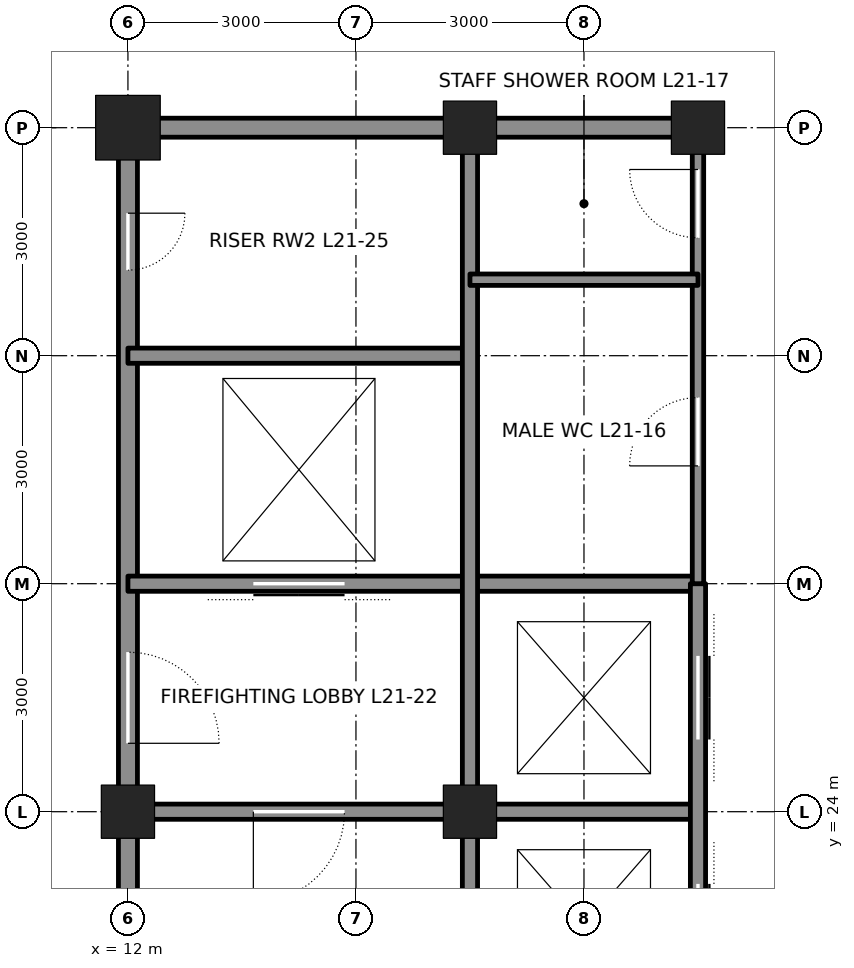
"""IFC4 building model, lengths in metres.
Left out: names, types, materials, properties, quantities, classifications, styles, units other than length and angle.
Written with IfcOpenShell. Run it as: python <this file> out.ifc"""

import sys

from ifc_helpers import new_model, si_unit, direction, frame, frame_2d, origin, origin_2d, place, context, subcontext, project, spatial, rectangle, hollow_rectangle, extrude, element, fill, save


model = new_model("IFC4")
c1 = context("Model", 3, precision=1e-05, world=origin(), true_north=direction((0.0, 1.0)))
c2 = subcontext(c1, "Body", "Model", "MODEL_VIEW")
j1 = project(units=[si_unit("LENGTHUNIT", "METRE"), si_unit("PLANEANGLEUNIT", "RADIAN")], contexts=[c1])
p1 = place(None, origin())
s1 = spatial("IfcSite", under=j1, at=p1, CompositionType="ELEMENT")
p2 = place(p1, origin())
s2 = spatial("IfcBuilding", under=s1, at=p2, CompositionType="ELEMENT")
p3 = place(p2, frame((0.0, 0.0, 102.3)))
s3 = spatial("IfcBuildingStorey", under=s2, at=p3, CompositionType="ELEMENT", Elevation=102.3)
p4 = place(p3, frame((12.0, 33.0, 0.0), z_axis=(0.0, 0.0, 1.0), x_axis=(1.0, 0.0, 0.0)))
e1 = element("IfcColumn", 1, at=p4, inside=s3, PredefinedType="COLUMN", context=c2, shape_type="SweptSolid", body=[
    extrude(hollow_rectangle(XDim=0.85, YDim=0.85, WallThickness=0.085, at=origin_2d()), origin(), (0.0, 0.0, 1.0), 4.5),
])
for number, where, z_axis, x_axis in (
    (2, (16.5, 33.0, 0.0), (0.0, 0.0, 1.0), (1.0, 0.0, 0.0)),
    (3, (19.5, 33.0, 0.0), (0.0, 0.0, 1.0), (1.0, 0.0, 0.0)),
    (4, (12.0, 24.0, 0.0), (0.0, 0.0, 1.0), (1.0, 0.0, 0.0)),
    (5, (16.5, 24.0, 0.0), (0.0, 0.0, 1.0), (1.0, 0.0, 0.0)),
):
    element("IfcColumn", number, at=place(p3, frame(where, z_axis=z_axis, x_axis=x_axis)), inside=s3, PredefinedType="COLUMN", context=c2, shape_type="SweptSolid", body=[
        extrude(hollow_rectangle(XDim=0.7, YDim=0.7, WallThickness=0.07, at=origin_2d()), origin(), (0.0, 0.0, 1.0), 4.5),
    ])
p5 = place(p3, frame((12.0, 21.25, 0.0), z_axis=(0.0, 0.0, 1.0), x_axis=(0.0, 1.0, 0.0)))
e6 = element("IfcWall", 6, at=p5, inside=s3, PredefinedType="SOLIDWALL", context=c2, shape_type="SweptSolid", body=[
    extrude(rectangle(XDim=2.5, YDim=0.25, at=frame_2d((1.25, 0.0))), origin(), (0.0, 0.0, 1.0), 3.413),
])
p6 = place(p3, frame((12.0, 24.25, 0.0), z_axis=(0.0, 0.0, 1.0), x_axis=(0.0, 1.0, 0.0)))
e7 = element("IfcWall", 7, at=p6, inside=s3, PredefinedType="SOLIDWALL", context=c2, shape_type="SweptSolid", body=[
    extrude(rectangle(XDim=8.5, YDim=0.25, at=frame_2d((4.25, 0.0))), origin(), (0.0, 0.0, 1.0), 3.413),
])
p7 = place(p6, frame((0.65, 0.0, 0.0)))
e8 = element("IfcOpeningElement", 8, at=p7, cuts=e7, PredefinedType="OPENING", context=c2, shape_type="SweptSolid", body=[
    extrude(rectangle(XDim=1.2, YDim=2.1, at=frame_2d((0.6, 1.05))), frame((0.0, 0.135, 0.0), z_axis=(0.0, -1.0, 0.0), x_axis=(1.0, 0.0, 0.0)), (0.0, 0.0, 1.0), 0.27),
])
p8 = place(p6, frame((6.875, 0.0, 0.0)))
e9 = element("IfcOpeningElement", 9, at=p8, cuts=e7, PredefinedType="OPENING", context=c2, shape_type="SweptSolid", body=[
    extrude(rectangle(XDim=0.75, YDim=2.1, at=frame_2d((0.375, 1.05))), frame((0.0, 0.135, 0.0), z_axis=(0.0, -1.0, 0.0), x_axis=(1.0, 0.0, 0.0)), (0.0, 0.0, 1.0), 0.27),
])
p9 = place(p3, frame((12.25, 24.0, 0.0), z_axis=(0.0, 0.0, 1.0), x_axis=(1.0, 0.0, 0.0)))
e10 = element("IfcWall", 10, at=p9, inside=s3, PredefinedType="SOLIDWALL", context=c2, shape_type="SweptSolid", body=[
    extrude(rectangle(XDim=4.0, YDim=0.2, at=frame_2d((2.0, 0.0))), origin(), (0.0, 0.0, 1.0), 3.39),
])
p10 = place(p9, frame((1.4, 0.0, 0.0)))
e11 = element("IfcOpeningElement", 11, at=p10, cuts=e10, PredefinedType="OPENING", context=c2, shape_type="SweptSolid", body=[
    extrude(rectangle(XDim=1.2, YDim=2.1, at=frame_2d((0.6, 1.05))), frame((0.0, 0.11, 0.0), z_axis=(0.0, -1.0, 0.0), x_axis=(1.0, 0.0, 0.0)), (0.0, 0.0, 1.0), 0.22),
])
p11 = place(p3, frame((16.75, 24.0, 0.0), z_axis=(0.0, 0.0, 1.0), x_axis=(1.0, 0.0, 0.0)))
e12 = element("IfcWall", 12, at=p11, inside=s3, PredefinedType="SOLIDWALL", context=c2, shape_type="SweptSolid", body=[
    extrude(rectangle(XDim=2.75, YDim=0.2, at=frame_2d((1.375, 0.0))), origin(), (0.0, 0.0, 1.0), 3.39),
])
p12 = place(p3, frame((12.0, 27.0, 0.0), z_axis=(0.0, 0.0, 1.0), x_axis=(1.0, 0.0, 0.0)))
e13 = element("IfcWall", 13, at=p12, inside=s3, PredefinedType="SOLIDWALL", context=c2, shape_type="SweptSolid", body=[
    extrude(rectangle(XDim=7.5, YDim=0.2, at=frame_2d((3.75, 0.0))), origin(), (0.0, 0.0, 1.0), 4.34),
])
p13 = place(p12, frame((1.65, 0.0, 0.0)))
e14 = element("IfcOpeningElement", 14, at=p13, cuts=e13, PredefinedType="OPENING", context=c2, shape_type="SweptSolid", body=[
    extrude(rectangle(XDim=1.2, YDim=2.1, at=frame_2d((0.6, 1.05))), frame((0.0, 0.11, 0.0), z_axis=(0.0, -1.0, 0.0), x_axis=(1.0, 0.0, 0.0)), (0.0, 0.0, 1.0), 0.22),
])
p14 = place(p3, frame((12.0, 30.0, 0.0), z_axis=(0.0, 0.0, 1.0), x_axis=(1.0, 0.0, 0.0)))
e15 = element("IfcWall", 15, at=p14, inside=s3, PredefinedType="SOLIDWALL", context=c2, shape_type="SweptSolid", body=[
    extrude(rectangle(XDim=4.5, YDim=0.2, at=frame_2d((2.25, 0.0))), origin(), (0.0, 0.0, 1.0), 4.34),
])
p15 = place(p3, frame((12.25, 33.0, 0.0), z_axis=(0.0, 0.0, 1.0), x_axis=(1.0, 0.0, 0.0)))
e16 = element("IfcWall", 16, at=p15, inside=s3, PredefinedType="SOLIDWALL", context=c2, shape_type="SweptSolid", body=[
    extrude(rectangle(XDim=4.0, YDim=0.25, at=frame_2d((2.0, 0.0))), origin(), (0.0, 0.0, 1.0), 3.481),
])
p16 = place(p3, frame((16.75, 33.0, 0.0), z_axis=(0.0, 0.0, 1.0), x_axis=(1.0, 0.0, 0.0)))
e17 = element("IfcWall", 17, at=p16, inside=s3, PredefinedType="SOLIDWALL", context=c2, shape_type="SweptSolid", body=[
    extrude(rectangle(XDim=2.5, YDim=0.25, at=frame_2d((1.25, 0.0))), origin(), (0.0, 0.0, 1.0), 3.481),
])
p17 = place(p3, frame((16.5, 21.25, 0.0), z_axis=(0.0, 0.0, 1.0), x_axis=(0.0, 1.0, 0.0)))
e18 = element("IfcWall", 18, at=p17, inside=s3, PredefinedType="SOLIDWALL", context=c2, shape_type="SweptSolid", body=[
    extrude(rectangle(XDim=2.5, YDim=0.2, at=frame_2d((1.25, 0.0))), origin(), (0.0, 0.0, 1.0), 3.413),
])
p18 = place(p3, frame((16.5, 24.25, 0.0), z_axis=(0.0, 0.0, 1.0), x_axis=(0.0, 1.0, 0.0)))
e19 = element("IfcWall", 19, at=p18, inside=s3, PredefinedType="SOLIDWALL", context=c2, shape_type="SweptSolid", body=[
    extrude(rectangle(XDim=8.5, YDim=0.2, at=frame_2d((4.25, 0.0))), origin(), (0.0, 0.0, 1.0), 3.413),
])
p19 = place(p3, frame((19.5, 15.0, 0.0), z_axis=(0.0, 0.0, 1.0), x_axis=(0.0, 1.0, 0.0)))
e20 = element("IfcWall", 20, at=p19, inside=s3, PredefinedType="SOLIDWALL", context=c2, shape_type="SweptSolid", body=[
    extrude(rectangle(XDim=12.0, YDim=0.2, at=frame_2d((6.0, 0.0))), origin(), (0.0, 0.0, 1.0), 3.365),
])
p20 = place(p19, frame((0.95, 0.0, 0.0)))
e21 = element("IfcOpeningElement", 21, at=p20, cuts=e20, PredefinedType="OPENING", context=c2, shape_type="SweptSolid", body=[
    extrude(rectangle(XDim=1.1, YDim=2.1, at=frame_2d((0.55, 1.05))), frame((0.0, 0.11, 0.0), z_axis=(0.0, -1.0, 0.0), x_axis=(1.0, 0.0, 0.0)), (0.0, 0.0, 1.0), 0.22),
])
p21 = place(p19, frame((3.95, 0.0, 0.0)))
e22 = element("IfcOpeningElement", 22, at=p21, cuts=e20, PredefinedType="OPENING", context=c2, shape_type="SweptSolid", body=[
    extrude(rectangle(XDim=1.1, YDim=2.1, at=frame_2d((0.55, 1.05))), frame((0.0, 0.11, 0.0), z_axis=(0.0, -1.0, 0.0), x_axis=(1.0, 0.0, 0.0)), (0.0, 0.0, 1.0), 0.22),
])
p22 = place(p19, frame((6.95, 0.0, 0.0)))
e23 = element("IfcOpeningElement", 23, at=p22, cuts=e20, PredefinedType="OPENING", context=c2, shape_type="SweptSolid", body=[
    extrude(rectangle(XDim=1.1, YDim=2.1, at=frame_2d((0.55, 1.05))), frame((0.0, 0.11, 0.0), z_axis=(0.0, -1.0, 0.0), x_axis=(1.0, 0.0, 0.0)), (0.0, 0.0, 1.0), 0.22),
])
p23 = place(p19, frame((9.95, 0.0, 0.0)))
e24 = element("IfcOpeningElement", 24, at=p23, cuts=e20, PredefinedType="OPENING", context=c2, shape_type="SweptSolid", body=[
    extrude(rectangle(XDim=1.1, YDim=2.1, at=frame_2d((0.55, 1.05))), frame((0.0, 0.11, 0.0), z_axis=(0.0, -1.0, 0.0), x_axis=(1.0, 0.0, 0.0)), (0.0, 0.0, 1.0), 0.22),
])
p24 = place(p3, frame((19.5, 27.0, 0.0), z_axis=(0.0, 0.0, 1.0), x_axis=(0.0, 1.0, 0.0)))
e25 = element("IfcWall", 25, at=p24, inside=s3, PredefinedType="PARTITIONING", context=c2, shape_type="SweptSolid", body=[
    extrude(rectangle(XDim=5.75, YDim=0.15, at=frame_2d((2.875, 0.0))), origin(), (0.0, 0.0, 1.0), 3.365),
])
p25 = place(p24, frame((1.55, 0.0, 0.0)))
e26 = element("IfcOpeningElement", 26, at=p25, cuts=e25, PredefinedType="OPENING", context=c2, shape_type="SweptSolid", body=[
    extrude(rectangle(XDim=0.9, YDim=2.1, at=frame_2d((0.45, 1.05))), frame((0.0, 0.085, 0.0), z_axis=(0.0, -1.0, 0.0), x_axis=(1.0, 0.0, 0.0)), (0.0, 0.0, 1.0), 0.17),
])
p26 = place(p24, frame((4.55, 0.0, 0.0)))
e27 = element("IfcOpeningElement", 27, at=p26, cuts=e25, PredefinedType="OPENING", context=c2, shape_type="SweptSolid", body=[
    extrude(rectangle(XDim=0.9, YDim=2.1, at=frame_2d((0.45, 1.05))), frame((0.0, 0.085, 0.0), z_axis=(0.0, -1.0, 0.0), x_axis=(1.0, 0.0, 0.0)), (0.0, 0.0, 1.0), 0.17),
])
p27 = place(p3, frame((16.5, 31.0, 0.0), z_axis=(0.0, 0.0, 1.0), x_axis=(1.0, 0.0, 0.0)))
e28 = element("IfcWall", 28, at=p27, inside=s3, PredefinedType="PARTITIONING", context=c2, shape_type="SweptSolid", body=[
    extrude(rectangle(XDim=3.0, YDim=0.15, at=frame_2d((1.5, 0.0))), origin(), (0.0, 0.0, 1.0), 4.34),
])
p28 = place(p10, frame((1.2, 0.0, 0.0), z_axis=(0.0, 0.0, 1.0), x_axis=(-1.0, 0.0, 0.0)))
e29 = element("IfcDoor", 29, at=p28, inside=s3, OperationType="SINGLE_SWING_RIGHT", PredefinedType="DOOR", context=c2, shape_type="SweptSolid", body=[
    extrude(rectangle(XDim=1.2, YDim=2.1, at=frame_2d((0.6, 1.05))), frame((0.0, 0.025, 0.0), z_axis=(0.0, -1.0, 0.0), x_axis=(1.0, 0.0, 0.0)), (0.0, 0.0, 1.0), 0.05),
])
fill(e11, e29)
p29 = place(p7, frame((1.2, 0.0, 0.0), z_axis=(0.0, 0.0, 1.0), x_axis=(-1.0, 0.0, 0.0)))
e30 = element("IfcDoor", 30, at=p29, inside=s3, OperationType="SINGLE_SWING_RIGHT", PredefinedType="DOOR", context=c2, shape_type="SweptSolid", body=[
    extrude(rectangle(XDim=1.2, YDim=2.1, at=frame_2d((0.6, 1.05))), frame((0.0, 0.025, 0.0), z_axis=(0.0, -1.0, 0.0), x_axis=(1.0, 0.0, 0.0)), (0.0, 0.0, 1.0), 0.05),
])
fill(e8, e30)
p30 = place(p13, origin())
e31 = element("IfcDoor", 31, at=p30, inside=s3, OperationType="DOUBLE_DOOR_SLIDING", PredefinedType="DOOR", context=c2, shape_type="SweptSolid", body=[
    extrude(rectangle(XDim=1.2, YDim=2.1, at=frame_2d((0.6, 1.05))), frame((0.0, 0.025, 0.0), z_axis=(0.0, -1.0, 0.0), x_axis=(1.0, 0.0, 0.0)), (0.0, 0.0, 1.0), 0.05),
])
fill(e14, e31)
p31 = place(p8, frame((0.75, 0.0, 0.0), z_axis=(0.0, 0.0, 1.0), x_axis=(-1.0, 0.0, 0.0)))
e32 = element("IfcDoor", 32, at=p31, inside=s3, OperationType="SINGLE_SWING_LEFT", PredefinedType="DOOR", context=c2, shape_type="SweptSolid", body=[
    extrude(rectangle(XDim=0.75, YDim=2.1, at=frame_2d((0.375, 1.05))), frame((0.0, 0.025, 0.0), z_axis=(0.0, -1.0, 0.0), x_axis=(1.0, 0.0, 0.0)), (0.0, 0.0, 1.0), 0.05),
])
fill(e9, e32)
p32 = place(p25, origin())
e33 = element("IfcDoor", 33, at=p32, inside=s3, OperationType="SINGLE_SWING_LEFT", PredefinedType="DOOR", context=c2, shape_type="SweptSolid", body=[
    extrude(rectangle(XDim=0.9, YDim=2.1, at=frame_2d((0.45, 1.05))), frame((0.0, 0.025, 0.0), z_axis=(0.0, -1.0, 0.0), x_axis=(1.0, 0.0, 0.0)), (0.0, 0.0, 1.0), 0.05),
])
fill(e26, e33)
p33 = place(p26, origin())
e34 = element("IfcDoor", 34, at=p33, inside=s3, OperationType="SINGLE_SWING_RIGHT", PredefinedType="DOOR", context=c2, shape_type="SweptSolid", body=[
    extrude(rectangle(XDim=0.9, YDim=2.1, at=frame_2d((0.45, 1.05))), frame((0.0, 0.025, 0.0), z_axis=(0.0, -1.0, 0.0), x_axis=(1.0, 0.0, 0.0)), (0.0, 0.0, 1.0), 0.05),
])
fill(e27, e34)
p34 = place(p22, origin())
e35 = element("IfcDoor", 35, at=p34, inside=s3, OperationType="DOUBLE_DOOR_SLIDING", PredefinedType="DOOR", context=c2, shape_type="SweptSolid", body=[
    extrude(rectangle(XDim=1.1, YDim=2.1, at=frame_2d((0.55, 1.05))), frame((0.0, 0.025, 0.0), z_axis=(0.0, -1.0, 0.0), x_axis=(1.0, 0.0, 0.0)), (0.0, 0.0, 1.0), 0.05),
])
fill(e23, e35)
p35 = place(p23, origin())
e36 = element("IfcDoor", 36, at=p35, inside=s3, OperationType="DOUBLE_DOOR_SLIDING", PredefinedType="DOOR", context=c2, shape_type="SweptSolid", body=[
    extrude(rectangle(XDim=1.1, YDim=2.1, at=frame_2d((0.55, 1.05))), frame((0.0, 0.025, 0.0), z_axis=(0.0, -1.0, 0.0), x_axis=(1.0, 0.0, 0.0)), (0.0, 0.0, 1.0), 0.05),
])
fill(e24, e36)
save(model, sys.argv[1])
